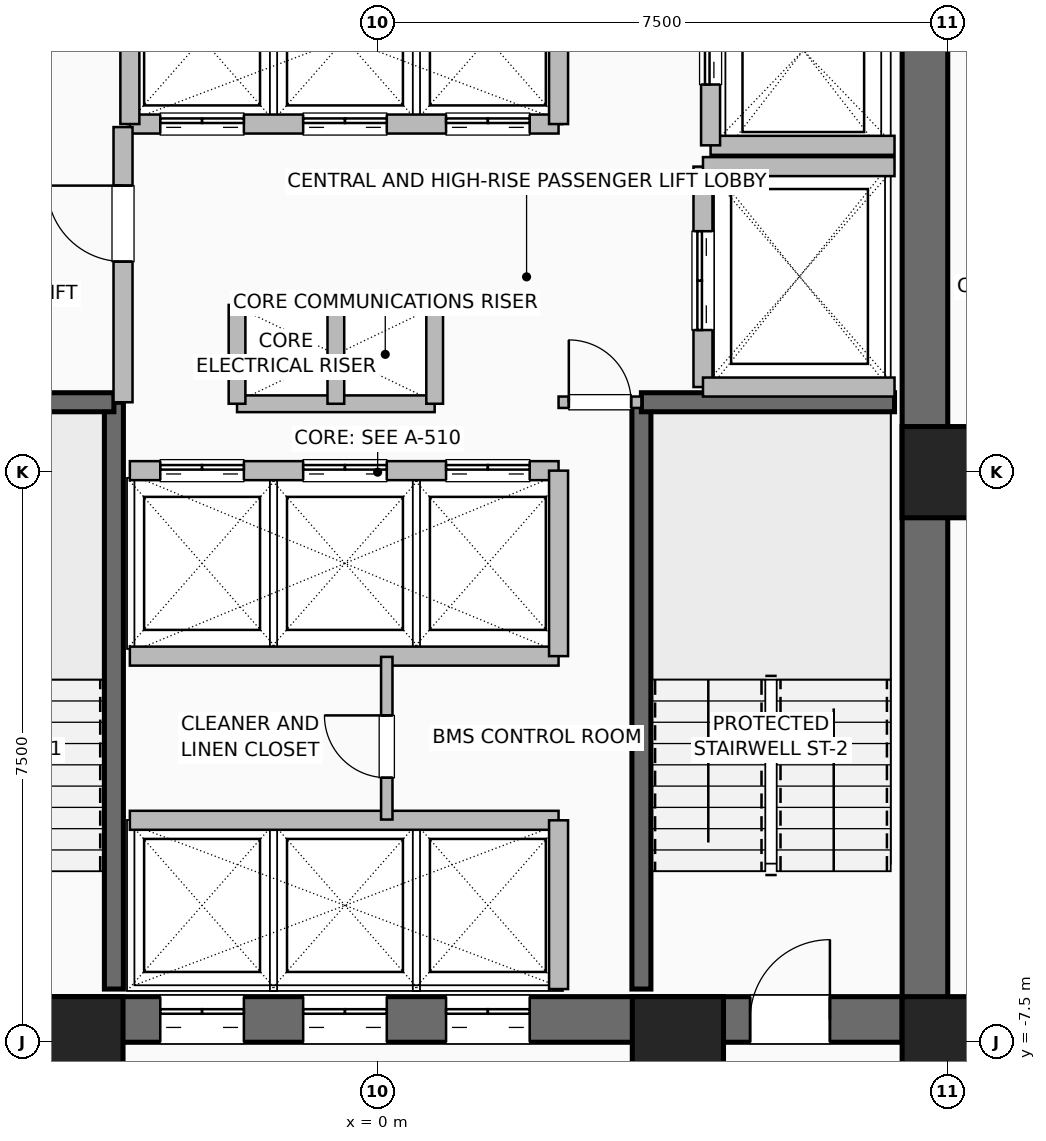
"""IFC4 building model, lengths in metres.
Left out: names, types, materials, properties, quantities, classifications, styles, units other than length and angle.
Written with IfcOpenShell. Run it as: python <this file> out.ifc"""

import sys

from ifc_helpers import new_model, si_unit, direction, frame, frame_2d, origin, origin_2d, place, context, subcontext, project, spatial, rectangle, hollow_rectangle, extrude, element, fill, save


model = new_model("IFC4")
c1 = context("Model", 3, precision=1e-05, world=origin(), true_north=direction((0.0, 1.0)))
c2 = subcontext(c1, "Body", "Model", "MODEL_VIEW")
j1 = project(units=[si_unit("LENGTHUNIT", "METRE"), si_unit("PLANEANGLEUNIT", "RADIAN")], contexts=[c1])
p1 = place(None, origin())
s1 = spatial("IfcSite", under=j1, at=p1, CompositionType="ELEMENT")
p2 = place(p1, origin())
s2 = spatial("IfcBuilding", under=s1, at=p2, CompositionType="ELEMENT")
p3 = place(p2, frame((0.0, 0.0, 37.5)))
s3 = spatial("IfcBuildingStorey", under=s2, at=p3, CompositionType="ELEMENT", Elevation=37.5)
for number, where, z_axis, x_axis in (
    (1, (-3.95, -7.5, 0.0), (0.0, 0.0, 1.0), (1.0, 0.0, 0.0)),
    (2, (3.95, -7.5, 0.0), (0.0, 0.0, 1.0), (1.0, 0.0, 0.0)),
    (3, (7.5, -7.5, 0.0), (0.0, 0.0, 1.0), (1.0, 0.0, 0.0)),
    (4, (7.5, 0.0, 0.0), (0.0, 0.0, 1.0), (1.0, 0.0, 0.0)),
):
    element("IfcColumn", number, at=place(p3, frame(where, z_axis=z_axis, x_axis=x_axis)), inside=s3, PredefinedType="COLUMN", context=c2, shape_type="SweptSolid", body=[
        extrude(hollow_rectangle(XDim=1.2, YDim=1.2, WallThickness=0.055, at=origin_2d()), origin(), (0.0, 0.0, 1.0), 3.5),
    ])
p4 = place(p3, frame((-7.5, -7.2, 0.0), z_axis=(0.0, 0.0, 1.0), x_axis=(1.0, 0.0, 0.0)))
e5 = element("IfcWall", 5, at=p4, inside=s3, PredefinedType="SHEAR", context=c2, shape_type="SweptSolid", body=[
    extrude(rectangle(XDim=15.0, YDim=0.6, at=frame_2d((7.5, 0.0))), origin(), (0.0, 0.0, 1.0), 3.25),
])
p5 = place(p4, frame((1.55, 0.0, 0.0)))
e6 = element("IfcOpeningElement", 6, at=p5, cuts=e5, PredefinedType="OPENING", context=c2, shape_type="SweptSolid", body=[
    extrude(rectangle(XDim=1.05, YDim=2.08, at=frame_2d((0.525, 1.04))), frame((0.0, 0.31, 0.0), z_axis=(0.0, -1.0, 0.0), x_axis=(1.0, 0.0, 0.0)), (0.0, 0.0, 1.0), 0.62),
])
p6 = place(p4, frame((12.4, 0.0, 0.0)))
e7 = element("IfcOpeningElement", 7, at=p6, cuts=e5, PredefinedType="OPENING", context=c2, shape_type="SweptSolid", body=[
    extrude(rectangle(XDim=1.05, YDim=2.08, at=frame_2d((0.525, 1.04))), frame((0.0, 0.31, 0.0), z_axis=(0.0, -1.0, 0.0), x_axis=(1.0, 0.0, 0.0)), (0.0, 0.0, 1.0), 0.62),
])
p7 = place(p4, frame((4.64, 0.0, 0.0)))
e8 = element("IfcOpeningElement", 8, at=p7, cuts=e5, PredefinedType="OPENING", context=c2, shape_type="SweptSolid", body=[
    extrude(rectangle(XDim=1.1, YDim=2.2, at=frame_2d((0.55, 1.1))), frame((0.0, 0.31, 0.0), z_axis=(0.0, -1.0, 0.0), x_axis=(1.0, 0.0, 0.0)), (0.0, 0.0, 1.0), 0.62),
])
p8 = place(p4, frame((6.52, 0.0, 0.0)))
e9 = element("IfcOpeningElement", 9, at=p8, cuts=e5, PredefinedType="OPENING", context=c2, shape_type="SweptSolid", body=[
    extrude(rectangle(XDim=1.1, YDim=2.2, at=frame_2d((0.55, 1.1))), frame((0.0, 0.31, 0.0), z_axis=(0.0, -1.0, 0.0), x_axis=(1.0, 0.0, 0.0)), (0.0, 0.0, 1.0), 0.62),
])
p9 = place(p4, frame((8.4, 0.0, 0.0)))
e10 = element("IfcOpeningElement", 10, at=p9, cuts=e5, PredefinedType="OPENING", context=c2, shape_type="SweptSolid", body=[
    extrude(rectangle(XDim=1.1, YDim=2.2, at=frame_2d((0.55, 1.1))), frame((0.0, 0.31, 0.0), z_axis=(0.0, -1.0, 0.0), x_axis=(1.0, 0.0, 0.0)), (0.0, 0.0, 1.0), 0.62),
])
p10 = place(p3, frame((7.2, -7.5, 0.0), z_axis=(0.0, 0.0, 1.0), x_axis=(0.0, 1.0, 0.0)))
e11 = element("IfcWall", 11, at=p10, inside=s3, PredefinedType="SHEAR", context=c2, shape_type="SweptSolid", body=[
    extrude(rectangle(XDim=15.0, YDim=0.6, at=frame_2d((7.5, 0.0))), origin(), (0.0, 0.0, 1.0), 3.25),
])
p11 = place(p3, frame((-3.47, -6.8, 0.0), z_axis=(0.0, 0.0, 1.0), x_axis=(0.0, 1.0, 0.0)))
e12 = element("IfcWall", 12, at=p11, inside=s3, PredefinedType="SHEAR", context=c2, shape_type="SweptSolid", body=[
    extrude(rectangle(XDim=7.72, YDim=0.25, at=frame_2d((3.86, 0.0))), origin(), (0.0, 0.0, 1.0), 3.25),
])
p12 = place(p3, frame((-6.8, 0.92, 0.0), z_axis=(0.0, 0.0, 1.0), x_axis=(1.0, 0.0, 0.0)))
e13 = element("IfcWall", 13, at=p12, inside=s3, PredefinedType="SHEAR", context=c2, shape_type="SweptSolid", body=[
    extrude(rectangle(XDim=3.33, YDim=0.25, at=frame_2d((1.665, 0.0))), origin(), (0.0, 0.0, 1.0), 3.25),
])
p13 = place(p3, frame((3.47, -6.8, 0.0), z_axis=(0.0, 0.0, 1.0), x_axis=(0.0, 1.0, 0.0)))
e14 = element("IfcWall", 14, at=p13, inside=s3, PredefinedType="SHEAR", context=c2, shape_type="SweptSolid", body=[
    extrude(rectangle(XDim=7.72, YDim=0.25, at=frame_2d((3.86, 0.0))), origin(), (0.0, 0.0, 1.0), 3.25),
])
p14 = place(p3, frame((3.47, 0.92, 0.0), z_axis=(0.0, 0.0, 1.0), x_axis=(1.0, 0.0, 0.0)))
e15 = element("IfcWall", 15, at=p14, inside=s3, PredefinedType="SHEAR", context=c2, shape_type="SweptSolid", body=[
    extrude(rectangle(XDim=3.33, YDim=0.25, at=frame_2d((1.665, 0.0))), origin(), (0.0, 0.0, 1.0), 3.25),
])
for number, where, z_axis, x_axis in (
    (16, (-1.85, 2.2, 0.0), (0.0, 0.0, 1.0), (1.0, 0.0, 0.0)),
    (17, (-1.85, 0.9, 0.0), (0.0, 0.0, 1.0), (1.0, 0.0, 0.0)),
):
    element("IfcWall", number, at=place(p3, frame(where, z_axis=z_axis, x_axis=x_axis)), inside=s3, PredefinedType="PARTITIONING", context=c2, shape_type="SweptSolid", body=[
        extrude(rectangle(XDim=2.6, YDim=0.22, at=frame_2d((1.3, 0.0))), origin(), (0.0, 0.0, 1.0), 3.25),
    ])
for number, where, z_axis, x_axis in (
    (18, (-0.55, 0.9, 0.0), (0.0, 0.0, 1.0), (0.0, 1.0, 0.0)),
    (19, (0.75, 0.9, 0.0), (0.0, 0.0, 1.0), (0.0, 1.0, 0.0)),
    (20, (-1.85, 0.9, 0.0), (0.0, 0.0, 1.0), (0.0, 1.0, 0.0)),
):
    element("IfcWall", number, at=place(p3, frame(where, z_axis=z_axis, x_axis=x_axis)), inside=s3, PredefinedType="PARTITIONING", context=c2, shape_type="SweptSolid", body=[
        extrude(rectangle(XDim=1.3, YDim=0.22, at=frame_2d((0.65, 0.0))), origin(), (0.0, 0.0, 1.0), 3.25),
    ])
p15 = place(p3, frame((-3.26, -4.58, 0.0), z_axis=(0.0, 0.0, 1.0), x_axis=(1.0, 0.0, 0.0)))
e21 = element("IfcWall", 21, at=p15, inside=s3, PredefinedType="SHEAR", context=c2, shape_type="SweptSolid", body=[
    extrude(rectangle(XDim=5.64, YDim=0.25, at=frame_2d((2.82, 0.0))), origin(), (0.0, 0.0, 1.0), 3.25),
])
p16 = place(p3, frame((2.38, -6.8, 0.0), z_axis=(0.0, 0.0, 1.0), x_axis=(0.0, 1.0, 0.0)))
e22 = element("IfcWall", 22, at=p16, inside=s3, PredefinedType="SHEAR", context=c2, shape_type="SweptSolid", body=[
    extrude(rectangle(XDim=2.22, YDim=0.25, at=frame_2d((1.11, 0.0))), origin(), (0.0, 0.0, 1.0), 3.25),
])
p17 = place(p3, frame((-3.26, 0.02, 0.0), z_axis=(0.0, 0.0, 1.0), x_axis=(1.0, 0.0, 0.0)))
e23 = element("IfcWall", 23, at=p17, inside=s3, PredefinedType="SHEAR", context=c2, shape_type="SweptSolid", body=[
    extrude(rectangle(XDim=5.64, YDim=0.25, at=frame_2d((2.82, 0.0))), origin(), (0.0, 0.0, 1.0), 3.25),
])
p18 = place(p17, frame((0.4, 0.0, 0.0)))
e24 = element("IfcOpeningElement", 24, at=p18, cuts=e23, PredefinedType="OPENING", context=c2, shape_type="SweptSolid", body=[
    extrude(rectangle(XDim=1.1, YDim=2.2, at=frame_2d((0.55, 1.1))), frame((0.0, 0.135, 0.0), z_axis=(0.0, -1.0, 0.0), x_axis=(1.0, 0.0, 0.0)), (0.0, 0.0, 1.0), 0.27),
])
p19 = place(p17, frame((2.28, 0.0, 0.0)))
e25 = element("IfcOpeningElement", 25, at=p19, cuts=e23, PredefinedType="OPENING", context=c2, shape_type="SweptSolid", body=[
    extrude(rectangle(XDim=1.1, YDim=2.2, at=frame_2d((0.55, 1.1))), frame((0.0, 0.135, 0.0), z_axis=(0.0, -1.0, 0.0), x_axis=(1.0, 0.0, 0.0)), (0.0, 0.0, 1.0), 0.27),
])
p20 = place(p17, frame((4.16, 0.0, 0.0)))
e26 = element("IfcOpeningElement", 26, at=p20, cuts=e23, PredefinedType="OPENING", context=c2, shape_type="SweptSolid", body=[
    extrude(rectangle(XDim=1.1, YDim=2.2, at=frame_2d((0.55, 1.1))), frame((0.0, 0.135, 0.0), z_axis=(0.0, -1.0, 0.0), x_axis=(1.0, 0.0, 0.0)), (0.0, 0.0, 1.0), 0.27),
])
p21 = place(p3, frame((-3.26, -2.42, 0.0), z_axis=(0.0, 0.0, 1.0), x_axis=(1.0, 0.0, 0.0)))
e27 = element("IfcWall", 27, at=p21, inside=s3, PredefinedType="SHEAR", context=c2, shape_type="SweptSolid", body=[
    extrude(rectangle(XDim=5.64, YDim=0.25, at=frame_2d((2.82, 0.0))), origin(), (0.0, 0.0, 1.0), 3.25),
])
p22 = place(p3, frame((2.38, -2.42, 0.0), z_axis=(0.0, 0.0, 1.0), x_axis=(0.0, 1.0, 0.0)))
e28 = element("IfcWall", 28, at=p22, inside=s3, PredefinedType="SHEAR", context=c2, shape_type="SweptSolid", body=[
    extrude(rectangle(XDim=2.44, YDim=0.25, at=frame_2d((1.22, 0.0))), origin(), (0.0, 0.0, 1.0), 3.25),
])
p23 = place(p3, frame((-3.26, 4.58, 0.0), z_axis=(0.0, 0.0, 1.0), x_axis=(1.0, 0.0, 0.0)))
e29 = element("IfcWall", 29, at=p23, inside=s3, PredefinedType="SHEAR", context=c2, shape_type="SweptSolid", body=[
    extrude(rectangle(XDim=5.64, YDim=0.25, at=frame_2d((2.82, 0.0))), origin(), (0.0, 0.0, 1.0), 3.25),
])
p24 = place(p23, frame((0.4, 0.0, 0.0)))
e30 = element("IfcOpeningElement", 30, at=p24, cuts=e29, PredefinedType="OPENING", context=c2, shape_type="SweptSolid", body=[
    extrude(rectangle(XDim=1.1, YDim=2.2, at=frame_2d((0.55, 1.1))), frame((0.0, 0.135, 0.0), z_axis=(0.0, -1.0, 0.0), x_axis=(1.0, 0.0, 0.0)), (0.0, 0.0, 1.0), 0.27),
])
p25 = place(p23, frame((2.28, 0.0, 0.0)))
e31 = element("IfcOpeningElement", 31, at=p25, cuts=e29, PredefinedType="OPENING", context=c2, shape_type="SweptSolid", body=[
    extrude(rectangle(XDim=1.1, YDim=2.2, at=frame_2d((0.55, 1.1))), frame((0.0, 0.135, 0.0), z_axis=(0.0, -1.0, 0.0), x_axis=(1.0, 0.0, 0.0)), (0.0, 0.0, 1.0), 0.27),
])
p26 = place(p23, frame((4.16, 0.0, 0.0)))
e32 = element("IfcOpeningElement", 32, at=p26, cuts=e29, PredefinedType="OPENING", context=c2, shape_type="SweptSolid", body=[
    extrude(rectangle(XDim=1.1, YDim=2.2, at=frame_2d((0.55, 1.1))), frame((0.0, 0.135, 0.0), z_axis=(0.0, -1.0, 0.0), x_axis=(1.0, 0.0, 0.0)), (0.0, 0.0, 1.0), 0.27),
])
for number, where, z_axis, x_axis in (
    (33, (-3.26, 4.58, 0.0), (0.0, 0.0, 1.0), (0.0, 1.0, 0.0)),
    (34, (2.38, 4.58, 0.0), (0.0, 0.0, 1.0), (0.0, 1.0, 0.0)),
):
    element("IfcWall", number, at=place(p3, frame(where, z_axis=z_axis, x_axis=x_axis)), inside=s3, PredefinedType="SHEAR", context=c2, shape_type="SweptSolid", body=[
        extrude(rectangle(XDim=2.22, YDim=0.25, at=frame_2d((1.11, 0.0))), origin(), (0.0, 0.0, 1.0), 3.25),
    ])
p27 = place(p3, frame((4.38, 4.3, 0.0), z_axis=(0.0, 0.0, 1.0), x_axis=(1.0, 0.0, 0.0)))
e35 = element("IfcWall", 35, at=p27, inside=s3, PredefinedType="SHEAR", context=c2, shape_type="SweptSolid", body=[
    extrude(rectangle(XDim=2.42, YDim=0.25, at=frame_2d((1.21, 0.0))), origin(), (0.0, 0.0, 1.0), 3.25),
])
p28 = place(p3, frame((4.38, 4.3, 0.0), z_axis=(0.0, 0.0, 1.0), x_axis=(0.0, 1.0, 0.0)))
e36 = element("IfcWall", 36, at=p28, inside=s3, PredefinedType="SHEAR", context=c2, shape_type="SweptSolid", body=[
    extrude(rectangle(XDim=2.5, YDim=0.25, at=frame_2d((1.25, 0.0))), origin(), (0.0, 0.0, 1.0), 3.25),
])
p29 = place(p28, frame((0.8, 0.0, 0.0)))
e37 = element("IfcOpeningElement", 37, at=p29, cuts=e36, PredefinedType="OPENING", context=c2, shape_type="SweptSolid", body=[
    extrude(rectangle(XDim=1.2, YDim=2.2, at=frame_2d((0.6, 1.1))), frame((0.0, 0.135, 0.0), z_axis=(0.0, -1.0, 0.0), x_axis=(1.0, 0.0, 0.0)), (0.0, 0.0, 1.0), 0.27),
])
p30 = place(p3, frame((4.28, 1.12, 0.0), z_axis=(0.0, 0.0, 1.0), x_axis=(0.0, 1.0, 0.0)))
e38 = element("IfcWall", 38, at=p30, inside=s3, PredefinedType="SHEAR", context=c2, shape_type="SweptSolid", body=[
    extrude(rectangle(XDim=2.9, YDim=0.25, at=frame_2d((1.45, 0.0))), origin(), (0.0, 0.0, 1.0), 3.25),
])
p31 = place(p30, frame((0.75, 0.0, 0.0)))
e39 = element("IfcOpeningElement", 39, at=p31, cuts=e38, PredefinedType="OPENING", context=c2, shape_type="SweptSolid", body=[
    extrude(rectangle(XDim=1.3, YDim=2.3, at=frame_2d((0.65, 1.15))), frame((0.0, 0.135, 0.0), z_axis=(0.0, -1.0, 0.0), x_axis=(1.0, 0.0, 0.0)), (0.0, 0.0, 1.0), 0.27),
])
for number, where, z_axis, x_axis in (
    (40, (4.28, 1.12, 0.0), (0.0, 0.0, 1.0), (1.0, 0.0, 0.0)),
    (41, (4.28, 4.02, 0.0), (0.0, 0.0, 1.0), (1.0, 0.0, 0.0)),
):
    element("IfcWall", number, at=place(p3, frame(where, z_axis=z_axis, x_axis=x_axis)), inside=s3, PredefinedType="SHEAR", context=c2, shape_type="SweptSolid", body=[
        extrude(rectangle(XDim=2.52, YDim=0.25, at=frame_2d((1.26, 0.0))), origin(), (0.0, 0.0, 1.0), 3.25),
    ])
p32 = place(p3, frame((-3.35, 0.92, 0.0), z_axis=(0.0, 0.0, 1.0), x_axis=(0.0, 1.0, 0.0)))
e42 = element("IfcWall", 42, at=p32, inside=s3, PredefinedType="SHEAR", context=c2, shape_type="SweptSolid", body=[
    extrude(rectangle(XDim=3.62, YDim=0.25, at=frame_2d((1.81, 0.0))), origin(), (0.0, 0.0, 1.0), 3.25),
])
p33 = place(p32, frame((1.85, 0.0, 0.0)))
e43 = element("IfcOpeningElement", 43, at=p33, cuts=e42, PredefinedType="OPENING", context=c2, shape_type="SweptSolid", body=[
    extrude(rectangle(XDim=1.0, YDim=2.08, at=frame_2d((0.5, 1.04))), frame((0.0, 0.135, 0.0), z_axis=(0.0, -1.0, 0.0), x_axis=(1.0, 0.0, 0.0)), (0.0, 0.0, 1.0), 0.27),
])
p34 = place(p3, frame((2.38, 0.92, 0.0), z_axis=(0.0, 0.0, 1.0), x_axis=(1.0, 0.0, 0.0)))
e44 = element("IfcWall", 44, at=p34, inside=s3, PredefinedType="PARTITIONING", context=c2, shape_type="SweptSolid", body=[
    extrude(rectangle(XDim=1.09, YDim=0.15, at=frame_2d((0.545, 0.0))), origin(), (0.0, 0.0, 1.0), 3.25),
])
p35 = place(p34, frame((0.135, 0.0, 0.0)))
e45 = element("IfcOpeningElement", 45, at=p35, cuts=e44, PredefinedType="OPENING", context=c2, shape_type="SweptSolid", body=[
    extrude(rectangle(XDim=0.82, YDim=2.05, at=frame_2d((0.41, 1.025))), frame((0.0, 0.085, 0.0), z_axis=(0.0, -1.0, 0.0), x_axis=(1.0, 0.0, 0.0)), (0.0, 0.0, 1.0), 0.17),
])
p36 = place(p3, frame((0.12, -4.57, 0.0), z_axis=(0.0, 0.0, 1.0), x_axis=(0.0, 1.0, 0.0)))
e46 = element("IfcWall", 46, at=p36, inside=s3, PredefinedType="PARTITIONING", context=c2, shape_type="SweptSolid", body=[
    extrude(rectangle(XDim=2.14, YDim=0.15, at=frame_2d((1.07, 0.0))), origin(), (0.0, 0.0, 1.0), 3.25),
])
p37 = place(p36, frame((0.55, 0.0, 0.0)))
e47 = element("IfcOpeningElement", 47, at=p37, cuts=e46, PredefinedType="OPENING", context=c2, shape_type="SweptSolid", body=[
    extrude(rectangle(XDim=0.82, YDim=2.05, at=frame_2d((0.41, 1.025))), frame((0.0, 0.085, 0.0), z_axis=(0.0, -1.0, 0.0), x_axis=(1.0, 0.0, 0.0)), (0.0, 0.0, 1.0), 0.17),
])
p38 = place(p6, origin())
e48 = element("IfcDoor", 48, at=p38, inside=s3, OperationType="SINGLE_SWING_RIGHT", PredefinedType="DOOR", context=c2, shape_type="SweptSolid", body=[
    extrude(rectangle(XDim=1.05, YDim=2.08, at=frame_2d((0.525, 1.04))), frame((0.0, 0.025, 0.0), z_axis=(0.0, -1.0, 0.0), x_axis=(1.0, 0.0, 0.0)), (0.0, 0.0, 1.0), 0.05),
])
fill(e7, e48)
p39 = place(p7, origin())
e49 = element("IfcDoor", 49, at=p39, inside=s3, OperationType="DOUBLE_DOOR_SLIDING", PredefinedType="DOOR", context=c2, shape_type="SweptSolid", body=[
    extrude(rectangle(XDim=1.1, YDim=2.2, at=frame_2d((0.55, 1.1))), frame((0.0, 0.025, 0.0), z_axis=(0.0, -1.0, 0.0), x_axis=(1.0, 0.0, 0.0)), (0.0, 0.0, 1.0), 0.05),
])
fill(e8, e49)
p40 = place(p8, origin())
e50 = element("IfcDoor", 50, at=p40, inside=s3, OperationType="DOUBLE_DOOR_SLIDING", PredefinedType="DOOR", context=c2, shape_type="SweptSolid", body=[
    extrude(rectangle(XDim=1.1, YDim=2.2, at=frame_2d((0.55, 1.1))), frame((0.0, 0.025, 0.0), z_axis=(0.0, -1.0, 0.0), x_axis=(1.0, 0.0, 0.0)), (0.0, 0.0, 1.0), 0.05),
])
fill(e9, e50)
p41 = place(p9, origin())
e51 = element("IfcDoor", 51, at=p41, inside=s3, OperationType="DOUBLE_DOOR_SLIDING", PredefinedType="DOOR", context=c2, shape_type="SweptSolid", body=[
    extrude(rectangle(XDim=1.1, YDim=2.2, at=frame_2d((0.55, 1.1))), frame((0.0, 0.025, 0.0), z_axis=(0.0, -1.0, 0.0), x_axis=(1.0, 0.0, 0.0)), (0.0, 0.0, 1.0), 0.05),
])
fill(e10, e51)
p42 = place(p18, origin())
e52 = element("IfcDoor", 52, at=p42, inside=s3, OperationType="DOUBLE_DOOR_SLIDING", PredefinedType="DOOR", context=c2, shape_type="SweptSolid", body=[
    extrude(rectangle(XDim=1.1, YDim=2.2, at=frame_2d((0.55, 1.1))), frame((0.0, 0.025, 0.0), z_axis=(0.0, -1.0, 0.0), x_axis=(1.0, 0.0, 0.0)), (0.0, 0.0, 1.0), 0.05),
])
fill(e24, e52)
p43 = place(p19, origin())
e53 = element("IfcDoor", 53, at=p43, inside=s3, OperationType="DOUBLE_DOOR_SLIDING", PredefinedType="DOOR", context=c2, shape_type="SweptSolid", body=[
    extrude(rectangle(XDim=1.1, YDim=2.2, at=frame_2d((0.55, 1.1))), frame((0.0, 0.025, 0.0), z_axis=(0.0, -1.0, 0.0), x_axis=(1.0, 0.0, 0.0)), (0.0, 0.0, 1.0), 0.05),
])
fill(e25, e53)
p44 = place(p20, origin())
e54 = element("IfcDoor", 54, at=p44, inside=s3, OperationType="DOUBLE_DOOR_SLIDING", PredefinedType="DOOR", context=c2, shape_type="SweptSolid", body=[
    extrude(rectangle(XDim=1.1, YDim=2.2, at=frame_2d((0.55, 1.1))), frame((0.0, 0.025, 0.0), z_axis=(0.0, -1.0, 0.0), x_axis=(1.0, 0.0, 0.0)), (0.0, 0.0, 1.0), 0.05),
])
fill(e26, e54)
p45 = place(p24, origin())
e55 = element("IfcDoor", 55, at=p45, inside=s3, OperationType="DOUBLE_DOOR_SLIDING", PredefinedType="DOOR", context=c2, shape_type="SweptSolid", body=[
    extrude(rectangle(XDim=1.1, YDim=2.2, at=frame_2d((0.55, 1.1))), frame((0.0, 0.025, 0.0), z_axis=(0.0, -1.0, 0.0), x_axis=(1.0, 0.0, 0.0)), (0.0, 0.0, 1.0), 0.05),
])
fill(e30, e55)
p46 = place(p25, origin())
e56 = element("IfcDoor", 56, at=p46, inside=s3, OperationType="DOUBLE_DOOR_SLIDING", PredefinedType="DOOR", context=c2, shape_type="SweptSolid", body=[
    extrude(rectangle(XDim=1.1, YDim=2.2, at=frame_2d((0.55, 1.1))), frame((0.0, 0.025, 0.0), z_axis=(0.0, -1.0, 0.0), x_axis=(1.0, 0.0, 0.0)), (0.0, 0.0, 1.0), 0.05),
])
fill(e31, e56)
p47 = place(p26, origin())
e57 = element("IfcDoor", 57, at=p47, inside=s3, OperationType="DOUBLE_DOOR_SLIDING", PredefinedType="DOOR", context=c2, shape_type="SweptSolid", body=[
    extrude(rectangle(XDim=1.1, YDim=2.2, at=frame_2d((0.55, 1.1))), frame((0.0, 0.025, 0.0), z_axis=(0.0, -1.0, 0.0), x_axis=(1.0, 0.0, 0.0)), (0.0, 0.0, 1.0), 0.05),
])
fill(e32, e57)
p48 = place(p29, origin())
e58 = element("IfcDoor", 58, at=p48, inside=s3, OperationType="DOUBLE_DOOR_SLIDING", PredefinedType="DOOR", context=c2, shape_type="SweptSolid", body=[
    extrude(rectangle(XDim=1.2, YDim=2.2, at=frame_2d((0.6, 1.1))), frame((0.0, 0.025, 0.0), z_axis=(0.0, -1.0, 0.0), x_axis=(1.0, 0.0, 0.0)), (0.0, 0.0, 1.0), 0.05),
])
fill(e37, e58)
p49 = place(p31, origin())
e59 = element("IfcDoor", 59, at=p49, inside=s3, OperationType="DOUBLE_DOOR_SLIDING", PredefinedType="DOOR", context=c2, shape_type="SweptSolid", body=[
    extrude(rectangle(XDim=1.3, YDim=2.3, at=frame_2d((0.65, 1.15))), frame((0.0, 0.025, 0.0), z_axis=(0.0, -1.0, 0.0), x_axis=(1.0, 0.0, 0.0)), (0.0, 0.0, 1.0), 0.05),
])
fill(e39, e59)
p50 = place(p33, origin())
e60 = element("IfcDoor", 60, at=p50, inside=s3, OperationType="SINGLE_SWING_RIGHT", PredefinedType="DOOR", context=c2, shape_type="SweptSolid", body=[
    extrude(rectangle(XDim=1.0, YDim=2.08, at=frame_2d((0.5, 1.04))), frame((0.0, 0.025, 0.0), z_axis=(0.0, -1.0, 0.0), x_axis=(1.0, 0.0, 0.0)), (0.0, 0.0, 1.0), 0.05),
])
fill(e43, e60)
p51 = place(p35, origin())
e61 = element("IfcDoor", 61, at=p51, inside=s3, OperationType="SINGLE_SWING_LEFT", PredefinedType="DOOR", context=c2, shape_type="SweptSolid", body=[
    extrude(rectangle(XDim=0.82, YDim=2.05, at=frame_2d((0.41, 1.025))), frame((0.0, 0.025, 0.0), z_axis=(0.0, -1.0, 0.0), x_axis=(1.0, 0.0, 0.0)), (0.0, 0.0, 1.0), 0.05),
])
fill(e45, e61)
p52 = place(p37, origin())
e62 = element("IfcDoor", 62, at=p52, inside=s3, OperationType="SINGLE_SWING_RIGHT", PredefinedType="DOOR", context=c2, shape_type="SweptSolid", body=[
    extrude(rectangle(XDim=0.82, YDim=2.05, at=frame_2d((0.41, 1.025))), frame((0.0, 0.025, 0.0), z_axis=(0.0, -1.0, 0.0), x_axis=(1.0, 0.0, 0.0)), (0.0, 0.0, 1.0), 0.05),
])
fill(e47, e62)
save(model, sys.argv[1])
